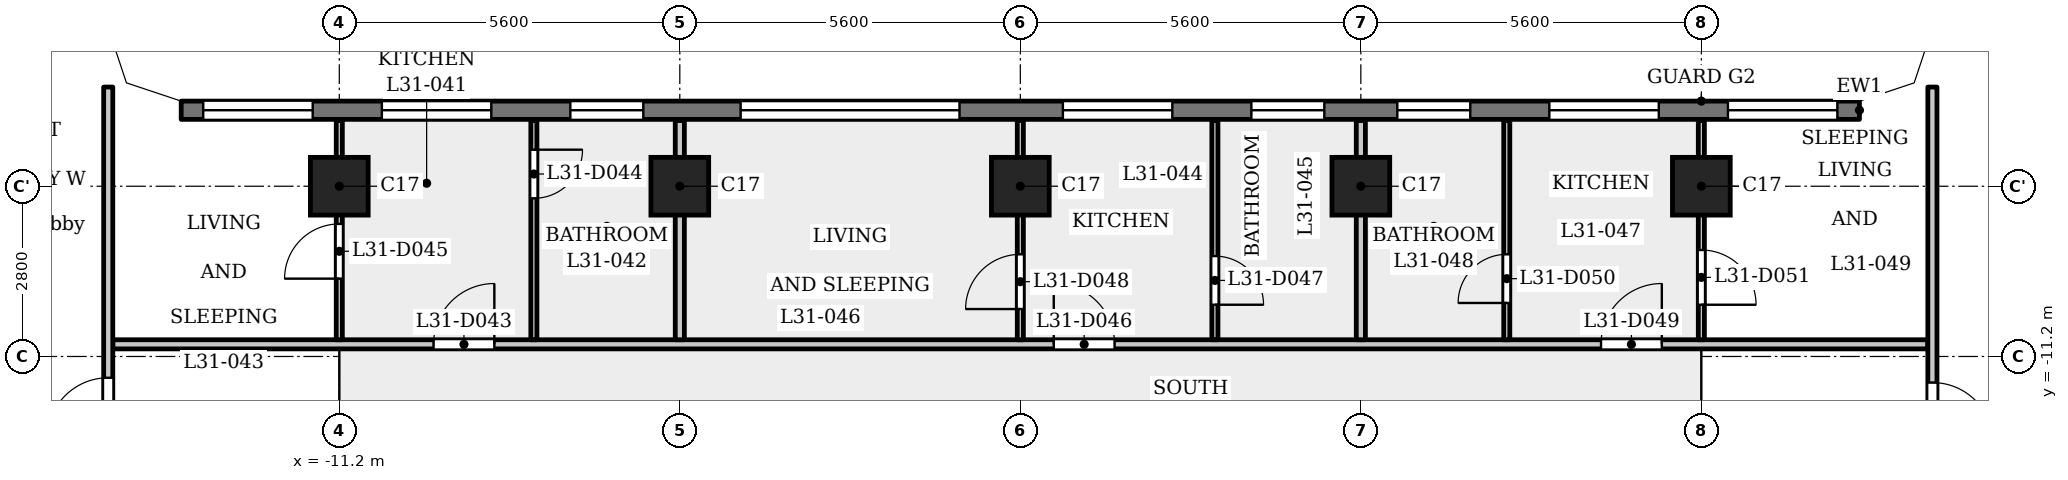
"""IFC4 building model, lengths in metres.
Left out: names, types, materials, properties, quantities, classifications, styles, units other than length and angle.
Written with IfcOpenShell. Run it as: python <this file> out.ifc"""

import sys

from ifc_helpers import new_model, si_unit, direction, frame, frame_2d, origin, origin_2d, place, context, subcontext, project, spatial, polyline, rectangle, outline, extrude, element, fill, save


model = new_model("IFC4")
c1 = context("Model", 3, precision=1e-05, world=origin(), true_north=direction((0.0, 1.0)))
c2 = subcontext(c1, "Body", "Model", "MODEL_VIEW")
j1 = project(units=[si_unit("LENGTHUNIT", "METRE"), si_unit("PLANEANGLEUNIT", "RADIAN")], contexts=[c1])
p1 = place(None, origin())
s1 = spatial("IfcSite", under=j1, at=p1, CompositionType="ELEMENT")
p2 = place(p1, origin())
s2 = spatial("IfcBuilding", under=s1, at=p2, CompositionType="ELEMENT")
p3 = place(p2, frame((0.0, 0.0, 121.8)))
s3 = spatial("IfcBuildingStorey", under=s2, at=p3, CompositionType="ELEMENT", Elevation=121.8)
for number, where, z_axis, x_axis in (
    (1, (-11.2, -8.4, 0.0), (0.0, 0.0, 1.0), (1.0, 0.0, 0.0)),
    (2, (-5.6, -8.4, 0.0), (0.0, 0.0, 1.0), (1.0, 0.0, 0.0)),
    (3, (0.0, -8.4, 0.0), (0.0, 0.0, 1.0), (1.0, 0.0, 0.0)),
    (4, (5.6, -8.4, 0.0), (0.0, 0.0, 1.0), (1.0, 0.0, 0.0)),
    (5, (11.2, -8.4, 0.0), (0.0, 0.0, 1.0), (1.0, 0.0, 0.0)),
):
    element("IfcColumn", number, at=place(p3, frame(where, z_axis=z_axis, x_axis=x_axis)), inside=s3, PredefinedType="COLUMN", context=c2, shape_type="SweptSolid", body=[
        extrude(rectangle(XDim=0.95, YDim=0.95, at=origin_2d()), origin(), (0.0, 0.0, 1.0), 3.5),
    ])
p4 = place(p3, frame((13.8, -7.15, 0.0), z_axis=(0.0, 0.0, 1.0), x_axis=(-1.0, 0.0, 0.0)))
e6 = element("IfcWall", 6, at=p4, inside=s3, PredefinedType="SOLIDWALL", context=c2, shape_type="SweptSolid", body=[
    extrude(rectangle(XDim=27.6, YDim=0.3, at=frame_2d((13.8, 0.0))), origin(), (0.0, 0.0, 1.0), 3.15),
])
p5 = place(p4, frame((0.363, 0.0, 0.9)))
e7 = element("IfcOpeningElement", 7, at=p5, cuts=e6, PredefinedType="OPENING", context=c2, shape_type="SweptSolid", body=[
    extrude(rectangle(XDim=1.8, YDim=1.25, at=frame_2d((0.9, 0.625))), frame((0.0, 0.16, 0.0), z_axis=(0.0, -1.0, 0.0), x_axis=(1.0, 0.0, 0.0)), (0.0, 0.0, 1.0), 0.32),
])
p6 = place(p4, frame((3.3, 0.0, 0.9)))
e8 = element("IfcOpeningElement", 8, at=p6, cuts=e6, PredefinedType="OPENING", context=c2, shape_type="SweptSolid", body=[
    extrude(rectangle(XDim=1.8, YDim=1.25, at=frame_2d((0.9, 0.625))), frame((0.0, 0.16, 0.0), z_axis=(0.0, -1.0, 0.0), x_axis=(1.0, 0.0, 0.0)), (0.0, 0.0, 1.0), 0.32),
])
p7 = place(p4, frame((6.4, 0.0, 0.6)))
e9 = element("IfcOpeningElement", 9, at=p7, cuts=e6, PredefinedType="OPENING", context=c2, shape_type="SweptSolid", body=[
    extrude(rectangle(XDim=1.2, YDim=1.55, at=frame_2d((0.6, 0.775))), frame((0.0, 0.16, 0.0), z_axis=(0.0, -1.0, 0.0), x_axis=(1.0, 0.0, 0.0)), (0.0, 0.0, 1.0), 0.32),
])
p8 = place(p4, frame((8.8, 0.0, 0.6)))
e10 = element("IfcOpeningElement", 10, at=p8, cuts=e6, PredefinedType="OPENING", context=c2, shape_type="SweptSolid", body=[
    extrude(rectangle(XDim=1.2, YDim=1.55, at=frame_2d((0.6, 0.775))), frame((0.0, 0.16, 0.0), z_axis=(0.0, -1.0, 0.0), x_axis=(1.0, 0.0, 0.0)), (0.0, 0.0, 1.0), 0.32),
])
p9 = place(p4, frame((11.3, 0.0, 0.9)))
e11 = element("IfcOpeningElement", 11, at=p9, cuts=e6, PredefinedType="OPENING", context=c2, shape_type="SweptSolid", body=[
    extrude(rectangle(XDim=1.8, YDim=1.25, at=frame_2d((0.9, 0.625))), frame((0.0, 0.16, 0.0), z_axis=(0.0, -1.0, 0.0), x_axis=(1.0, 0.0, 0.0)), (0.0, 0.0, 1.0), 0.32),
])
p10 = place(p4, frame((14.8, 0.0, 1.2)))
e12 = element("IfcOpeningElement", 12, at=p10, cuts=e6, PredefinedType="OPENING", context=c2, shape_type="SweptSolid", body=[
    extrude(rectangle(XDim=3.6, YDim=0.95, at=frame_2d((1.8, 0.475))), frame((0.0, 0.16, 0.0), z_axis=(0.0, -1.0, 0.0), x_axis=(1.0, 0.0, 0.0)), (0.0, 0.0, 1.0), 0.32),
])
p11 = place(p4, frame((20.0, 0.0, 0.6)))
e13 = element("IfcOpeningElement", 13, at=p11, cuts=e6, PredefinedType="OPENING", context=c2, shape_type="SweptSolid", body=[
    extrude(rectangle(XDim=1.2, YDim=1.55, at=frame_2d((0.6, 0.775))), frame((0.0, 0.16, 0.0), z_axis=(0.0, -1.0, 0.0), x_axis=(1.0, 0.0, 0.0)), (0.0, 0.0, 1.0), 0.32),
])
p12 = place(p4, frame((22.5, 0.0, 0.9)))
e14 = element("IfcOpeningElement", 14, at=p12, cuts=e6, PredefinedType="OPENING", context=c2, shape_type="SweptSolid", body=[
    extrude(rectangle(XDim=1.8, YDim=1.25, at=frame_2d((0.9, 0.625))), frame((0.0, 0.16, 0.0), z_axis=(0.0, -1.0, 0.0), x_axis=(1.0, 0.0, 0.0)), (0.0, 0.0, 1.0), 0.32),
])
p13 = place(p4, frame((25.438, 0.0, 0.9)))
e15 = element("IfcOpeningElement", 15, at=p13, cuts=e6, PredefinedType="OPENING", context=c2, shape_type="SweptSolid", body=[
    extrude(rectangle(XDim=1.8, YDim=1.25, at=frame_2d((0.9, 0.625))), frame((0.0, 0.16, 0.0), z_axis=(0.0, -1.0, 0.0), x_axis=(1.0, 0.0, 0.0)), (0.0, 0.0, 1.0), 0.32),
])
p14 = place(p3, frame((-14.925, -11.0, 0.0), z_axis=(0.0, 0.0, 1.0), x_axis=(1.0, 0.0, 0.0)))
e16 = element("IfcWall", 16, at=p14, inside=s3, PredefinedType="PARTITIONING", context=c2, shape_type="SweptSolid", body=[
    extrude(rectangle(XDim=29.85, YDim=0.15, at=frame_2d((14.925, 0.0))), origin(), (0.0, 0.0, 1.0), 3.15),
])
p15 = place(p14, frame((5.275, 0.0, 0.0)))
e17 = element("IfcOpeningElement", 17, at=p15, cuts=e16, PredefinedType="OPENING", context=c2, shape_type="SweptSolid", body=[
    extrude(rectangle(XDim=1.0, YDim=2.1, at=frame_2d((0.5, 1.05))), frame((0.0, 0.085, 0.0), z_axis=(0.0, -1.0, 0.0), x_axis=(1.0, 0.0, 0.0)), (0.0, 0.0, 1.0), 0.17),
])
p16 = place(p14, frame((15.475, 0.0, 0.0)))
e18 = element("IfcOpeningElement", 18, at=p16, cuts=e16, PredefinedType="OPENING", context=c2, shape_type="SweptSolid", body=[
    extrude(rectangle(XDim=1.0, YDim=2.1, at=frame_2d((0.5, 1.05))), frame((0.0, 0.085, 0.0), z_axis=(0.0, -1.0, 0.0), x_axis=(1.0, 0.0, 0.0)), (0.0, 0.0, 1.0), 0.17),
])
p17 = place(p14, frame((24.475, 0.0, 0.0)))
e19 = element("IfcOpeningElement", 19, at=p17, cuts=e16, PredefinedType="OPENING", context=c2, shape_type="SweptSolid", body=[
    extrude(rectangle(XDim=1.0, YDim=2.1, at=frame_2d((0.5, 1.05))), frame((0.0, 0.085, 0.0), z_axis=(0.0, -1.0, 0.0), x_axis=(1.0, 0.0, 0.0)), (0.0, 0.0, 1.0), 0.17),
])
p18 = place(p3, frame((-15.0, -13.125, 0.0), z_axis=(0.0, 0.0, 1.0), x_axis=(0.0, 1.0, 0.0)))
e20 = element("IfcWall", 20, at=p18, inside=s3, PredefinedType="PARTITIONING", context=c2, shape_type="SweptSolid", body=[
    extrude(rectangle(XDim=6.356, YDim=0.15, at=frame_2d((3.178, 0.0))), origin(), (0.0, 0.0, 1.0), 3.15),
])
p19 = place(p18, frame((0.575, 0.0, 0.0)))
e21 = element("IfcOpeningElement", 21, at=p19, cuts=e20, PredefinedType="OPENING", context=c2, shape_type="SweptSolid", body=[
    extrude(rectangle(XDim=1.0, YDim=2.1, at=frame_2d((0.5, 1.05))), frame((0.0, 0.085, 0.0), z_axis=(0.0, -1.0, 0.0), x_axis=(1.0, 0.0, 0.0)), (0.0, 0.0, 1.0), 0.17),
])
p20 = place(p3, frame((-11.2, -10.925, 0.0), z_axis=(0.0, 0.0, 1.0), x_axis=(0.0, 1.0, 0.0)))
e22 = element("IfcWall", 22, at=p20, inside=s3, PredefinedType="PARTITIONING", context=c2, shape_type="SweptSolid", body=[
    extrude(rectangle(XDim=3.605, YDim=0.1, at=frame_2d((1.802, 0.0))), origin(), (0.0, 0.0, 1.0), 3.15),
])
p21 = place(p20, frame((1.005, 0.0, 0.0)))
e23 = element("IfcOpeningElement", 23, at=p21, cuts=e22, PredefinedType="OPENING", context=c2, shape_type="SweptSolid", body=[
    extrude(rectangle(XDim=0.9, YDim=2.1, at=frame_2d((0.45, 1.05))), frame((0.0, 0.06, 0.0), z_axis=(0.0, -1.0, 0.0), x_axis=(1.0, 0.0, 0.0)), (0.0, 0.0, 1.0), 0.12),
])
p22 = place(p3, frame((-8.0, -10.925, 0.0), z_axis=(0.0, 0.0, 1.0), x_axis=(0.0, 1.0, 0.0)))
e24 = element("IfcWall", 24, at=p22, inside=s3, PredefinedType="PARTITIONING", context=c2, shape_type="SweptSolid", body=[
    extrude(rectangle(XDim=3.605, YDim=0.1, at=frame_2d((1.802, 0.0))), origin(), (0.0, 0.0, 1.0), 3.15),
])
p23 = place(p22, frame((2.326, 0.0, 0.0)))
e25 = element("IfcOpeningElement", 25, at=p23, cuts=e24, PredefinedType="OPENING", context=c2, shape_type="SweptSolid", body=[
    extrude(rectangle(XDim=0.8, YDim=2.1, at=frame_2d((0.4, 1.05))), frame((0.0, 0.06, 0.0), z_axis=(0.0, -1.0, 0.0), x_axis=(1.0, 0.0, 0.0)), (0.0, 0.0, 1.0), 0.12),
])
p24 = place(p3, frame((-5.6, -10.925, 0.0), z_axis=(0.0, 0.0, 1.0), x_axis=(0.0, 1.0, 0.0)))
e26 = element("IfcWall", 26, at=p24, inside=s3, PredefinedType="PARTITIONING", context=c2, shape_type="SweptSolid", body=[
    extrude(rectangle(XDim=3.605, YDim=0.15, at=frame_2d((1.802, 0.0))), origin(), (0.0, 0.0, 1.0), 3.15),
])
p25 = place(p3, frame((0.0, -10.925, 0.0), z_axis=(0.0, 0.0, 1.0), x_axis=(0.0, 1.0, 0.0)))
e27 = element("IfcWall", 27, at=p25, inside=s3, PredefinedType="PARTITIONING", context=c2, shape_type="SweptSolid", body=[
    extrude(rectangle(XDim=3.605, YDim=0.1, at=frame_2d((1.802, 0.0))), origin(), (0.0, 0.0, 1.0), 3.15),
])
p26 = place(p25, frame((0.505, 0.0, 0.0)))
e28 = element("IfcOpeningElement", 28, at=p26, cuts=e27, PredefinedType="OPENING", context=c2, shape_type="SweptSolid", body=[
    extrude(rectangle(XDim=0.9, YDim=2.1, at=frame_2d((0.45, 1.05))), frame((0.0, 0.06, 0.0), z_axis=(0.0, -1.0, 0.0), x_axis=(1.0, 0.0, 0.0)), (0.0, 0.0, 1.0), 0.12),
])
p27 = place(p3, frame((3.2, -10.925, 0.0), z_axis=(0.0, 0.0, 1.0), x_axis=(0.0, 1.0, 0.0)))
e29 = element("IfcWall", 29, at=p27, inside=s3, PredefinedType="PARTITIONING", context=c2, shape_type="SweptSolid", body=[
    extrude(rectangle(XDim=3.605, YDim=0.1, at=frame_2d((1.802, 0.0))), origin(), (0.0, 0.0, 1.0), 3.15),
])
p28 = place(p27, frame((0.576, 0.0, 0.0)))
e30 = element("IfcOpeningElement", 30, at=p28, cuts=e29, PredefinedType="OPENING", context=c2, shape_type="SweptSolid", body=[
    extrude(rectangle(XDim=0.8, YDim=2.1, at=frame_2d((0.4, 1.05))), frame((0.0, 0.06, 0.0), z_axis=(0.0, -1.0, 0.0), x_axis=(1.0, 0.0, 0.0)), (0.0, 0.0, 1.0), 0.12),
])
p29 = place(p3, frame((5.6, -10.925, 0.0), z_axis=(0.0, 0.0, 1.0), x_axis=(0.0, 1.0, 0.0)))
e31 = element("IfcWall", 31, at=p29, inside=s3, PredefinedType="PARTITIONING", context=c2, shape_type="SweptSolid", body=[
    extrude(rectangle(XDim=3.605, YDim=0.15, at=frame_2d((1.802, 0.0))), origin(), (0.0, 0.0, 1.0), 3.15),
])
p30 = place(p3, frame((8.0, -10.925, 0.0), z_axis=(0.0, 0.0, 1.0), x_axis=(0.0, 1.0, 0.0)))
e32 = element("IfcWall", 32, at=p30, inside=s3, PredefinedType="PARTITIONING", context=c2, shape_type="SweptSolid", body=[
    extrude(rectangle(XDim=3.605, YDim=0.1, at=frame_2d((1.802, 0.0))), origin(), (0.0, 0.0, 1.0), 3.15),
])
p31 = place(p30, frame((0.605, 0.0, 0.0)))
e33 = element("IfcOpeningElement", 33, at=p31, cuts=e32, PredefinedType="OPENING", context=c2, shape_type="SweptSolid", body=[
    extrude(rectangle(XDim=0.8, YDim=2.1, at=frame_2d((0.4, 1.05))), frame((0.0, 0.06, 0.0), z_axis=(0.0, -1.0, 0.0), x_axis=(1.0, 0.0, 0.0)), (0.0, 0.0, 1.0), 0.12),
])
p32 = place(p3, frame((11.2, -10.925, 0.0), z_axis=(0.0, 0.0, 1.0), x_axis=(0.0, 1.0, 0.0)))
e34 = element("IfcWall", 34, at=p32, inside=s3, PredefinedType="PARTITIONING", context=c2, shape_type="SweptSolid", body=[
    extrude(rectangle(XDim=3.605, YDim=0.1, at=frame_2d((1.802, 0.0))), origin(), (0.0, 0.0, 1.0), 3.15),
])
p33 = place(p32, frame((0.576, 0.0, 0.0)))
e35 = element("IfcOpeningElement", 35, at=p33, cuts=e34, PredefinedType="OPENING", context=c2, shape_type="SweptSolid", body=[
    extrude(rectangle(XDim=0.9, YDim=2.1, at=frame_2d((0.45, 1.05))), frame((0.0, 0.06, 0.0), z_axis=(0.0, -1.0, 0.0), x_axis=(1.0, 0.0, 0.0)), (0.0, 0.0, 1.0), 0.12),
])
p34 = place(p3, frame((15.0, -13.125, 0.0), z_axis=(0.0, 0.0, 1.0), x_axis=(0.0, 1.0, 0.0)))
e36 = element("IfcWall", 36, at=p34, inside=s3, PredefinedType="PARTITIONING", context=c2, shape_type="SweptSolid", body=[
    extrude(rectangle(XDim=6.356, YDim=0.15, at=frame_2d((3.178, 0.0))), origin(), (0.0, 0.0, 1.0), 3.15),
])
p35 = place(p34, frame((0.496, 0.0, 0.0)))
e37 = element("IfcOpeningElement", 37, at=p35, cuts=e36, PredefinedType="OPENING", context=c2, shape_type="SweptSolid", body=[
    extrude(rectangle(XDim=1.0, YDim=2.1, at=frame_2d((0.5, 1.05))), frame((0.0, 0.085, 0.0), z_axis=(0.0, -1.0, 0.0), x_axis=(1.0, 0.0, 0.0)), (0.0, 0.0, 1.0), 0.17),
])
p36 = place(p3, origin())
e38 = element("IfcWall", 38, at=p36, inside=s3, PredefinedType="SOLIDWALL", context=c2, shape_type="SweptSolid", body=[
    extrude(outline(polyline([(14.937, -6.937), (15.3, -5.849), (15.3, -5.8), (15.0, -5.8), (14.7, -6.7), (13.8, -7.0), (13.8, -7.3), (13.849, -7.3), (14.937, -6.937)])), origin(), (0.0, 0.0, 1.0), 3.15),
])
e39 = element("IfcWall", 39, at=p36, inside=s3, PredefinedType="SOLIDWALL", context=c2, shape_type="SweptSolid", body=[
    extrude(outline(polyline([(-14.937, -6.937), (-13.849, -7.3), (-13.8, -7.3), (-13.8, -7.0), (-14.7, -6.7), (-15.0, -5.8), (-15.3, -5.8), (-15.3, -5.849), (-14.937, -6.937)])), origin(), (0.0, 0.0, 1.0), 3.15),
])
p37 = place(p19, origin())
e40 = element("IfcDoor", 40, at=p37, inside=s3, OperationType="SINGLE_SWING_RIGHT", PredefinedType="DOOR", context=c2, shape_type="SweptSolid", body=[
    extrude(rectangle(XDim=1.0, YDim=2.1, at=frame_2d((0.5, 1.05))), frame((0.0, 0.025, 0.0), z_axis=(0.0, -1.0, 0.0), x_axis=(1.0, 0.0, 0.0)), (0.0, 0.0, 1.0), 0.05),
])
fill(e21, e40)
p38 = place(p35, origin())
e41 = element("IfcDoor", 41, at=p38, inside=s3, OperationType="SINGLE_SWING_LEFT", PredefinedType="DOOR", context=c2, shape_type="SweptSolid", body=[
    extrude(rectangle(XDim=1.0, YDim=2.1, at=frame_2d((0.5, 1.05))), frame((0.0, 0.025, 0.0), z_axis=(0.0, -1.0, 0.0), x_axis=(1.0, 0.0, 0.0)), (0.0, 0.0, 1.0), 0.05),
])
fill(e37, e41)
p39 = place(p15, origin())
e42 = element("IfcDoor", 42, at=p39, inside=s3, OperationType="SINGLE_SWING_LEFT", PredefinedType="DOOR", context=c2, shape_type="SweptSolid", body=[
    extrude(rectangle(XDim=1.0, YDim=2.1, at=frame_2d((0.5, 1.05))), frame((0.0, 0.025, 0.0), z_axis=(0.0, -1.0, 0.0), x_axis=(1.0, 0.0, 0.0)), (0.0, 0.0, 1.0), 0.05),
])
fill(e17, e42)
p40 = place(p23, origin())
e43 = element("IfcDoor", 43, at=p40, inside=s3, OperationType="SINGLE_SWING_RIGHT", PredefinedType="DOOR", context=c2, shape_type="SweptSolid", body=[
    extrude(rectangle(XDim=0.8, YDim=2.1, at=frame_2d((0.4, 1.05))), frame((0.0, 0.025, 0.0), z_axis=(0.0, -1.0, 0.0), x_axis=(1.0, 0.0, 0.0)), (0.0, 0.0, 1.0), 0.05),
])
fill(e25, e43)
p41 = place(p21, origin())
e44 = element("IfcDoor", 44, at=p41, inside=s3, OperationType="SINGLE_SWING_RIGHT", PredefinedType="DOOR", context=c2, shape_type="SweptSolid", body=[
    extrude(rectangle(XDim=0.9, YDim=2.1, at=frame_2d((0.45, 1.05))), frame((0.0, 0.025, 0.0), z_axis=(0.0, -1.0, 0.0), x_axis=(1.0, 0.0, 0.0)), (0.0, 0.0, 1.0), 0.05),
])
fill(e23, e44)
p42 = place(p16, origin())
e45 = element("IfcDoor", 45, at=p42, inside=s3, OperationType="SINGLE_SWING_RIGHT", PredefinedType="DOOR", context=c2, shape_type="SweptSolid", body=[
    extrude(rectangle(XDim=1.0, YDim=2.1, at=frame_2d((0.5, 1.05))), frame((0.0, 0.025, 0.0), z_axis=(0.0, -1.0, 0.0), x_axis=(1.0, 0.0, 0.0)), (0.0, 0.0, 1.0), 0.05),
])
fill(e18, e45)
p43 = place(p28, origin())
e46 = element("IfcDoor", 46, at=p43, inside=s3, OperationType="SINGLE_SWING_LEFT", PredefinedType="DOOR", context=c2, shape_type="SweptSolid", body=[
    extrude(rectangle(XDim=0.8, YDim=2.1, at=frame_2d((0.4, 1.05))), frame((0.0, 0.025, 0.0), z_axis=(0.0, -1.0, 0.0), x_axis=(1.0, 0.0, 0.0)), (0.0, 0.0, 1.0), 0.05),
])
fill(e30, e46)
p44 = place(p26, origin())
e47 = element("IfcDoor", 47, at=p44, inside=s3, OperationType="SINGLE_SWING_RIGHT", PredefinedType="DOOR", context=c2, shape_type="SweptSolid", body=[
    extrude(rectangle(XDim=0.9, YDim=2.1, at=frame_2d((0.45, 1.05))), frame((0.0, 0.025, 0.0), z_axis=(0.0, -1.0, 0.0), x_axis=(1.0, 0.0, 0.0)), (0.0, 0.0, 1.0), 0.05),
])
fill(e28, e47)
p45 = place(p17, origin())
e48 = element("IfcDoor", 48, at=p45, inside=s3, OperationType="SINGLE_SWING_LEFT", PredefinedType="DOOR", context=c2, shape_type="SweptSolid", body=[
    extrude(rectangle(XDim=1.0, YDim=2.1, at=frame_2d((0.5, 1.05))), frame((0.0, 0.025, 0.0), z_axis=(0.0, -1.0, 0.0), x_axis=(1.0, 0.0, 0.0)), (0.0, 0.0, 1.0), 0.05),
])
fill(e19, e48)
p46 = place(p31, origin())
e49 = element("IfcDoor", 49, at=p46, inside=s3, OperationType="SINGLE_SWING_RIGHT", PredefinedType="DOOR", context=c2, shape_type="SweptSolid", body=[
    extrude(rectangle(XDim=0.8, YDim=2.1, at=frame_2d((0.4, 1.05))), frame((0.0, 0.025, 0.0), z_axis=(0.0, -1.0, 0.0), x_axis=(1.0, 0.0, 0.0)), (0.0, 0.0, 1.0), 0.05),
])
fill(e33, e49)
p47 = place(p33, origin())
e50 = element("IfcDoor", 50, at=p47, inside=s3, OperationType="SINGLE_SWING_LEFT", PredefinedType="DOOR", context=c2, shape_type="SweptSolid", body=[
    extrude(rectangle(XDim=0.9, YDim=2.1, at=frame_2d((0.45, 1.05))), frame((0.0, 0.025, 0.0), z_axis=(0.0, -1.0, 0.0), x_axis=(1.0, 0.0, 0.0)), (0.0, 0.0, 1.0), 0.05),
])
fill(e35, e50)
p48 = place(p5, origin())
e51 = element("IfcWindow", 51, at=p48, inside=s3, PartitioningType="SINGLE_PANEL", PredefinedType="WINDOW", context=c2, shape_type="SweptSolid", body=[
    extrude(rectangle(XDim=1.8, YDim=1.25, at=frame_2d((0.9, 0.625))), frame((0.0, 0.03, 0.0), z_axis=(0.0, -1.0, 0.0), x_axis=(1.0, 0.0, 0.0)), (0.0, 0.0, 1.0), 0.06),
])
fill(e7, e51)
p49 = place(p6, origin())
e52 = element("IfcWindow", 52, at=p49, inside=s3, PartitioningType="SINGLE_PANEL", PredefinedType="WINDOW", context=c2, shape_type="SweptSolid", body=[
    extrude(rectangle(XDim=1.8, YDim=1.25, at=frame_2d((0.9, 0.625))), frame((0.0, 0.03, 0.0), z_axis=(0.0, -1.0, 0.0), x_axis=(1.0, 0.0, 0.0)), (0.0, 0.0, 1.0), 0.06),
])
fill(e8, e52)
p50 = place(p7, origin())
e53 = element("IfcWindow", 53, at=p50, inside=s3, PartitioningType="SINGLE_PANEL", PredefinedType="WINDOW", context=c2, shape_type="SweptSolid", body=[
    extrude(rectangle(XDim=1.2, YDim=1.55, at=frame_2d((0.6, 0.775))), frame((0.0, 0.03, 0.0), z_axis=(0.0, -1.0, 0.0), x_axis=(1.0, 0.0, 0.0)), (0.0, 0.0, 1.0), 0.06),
])
fill(e9, e53)
p51 = place(p8, origin())
e54 = element("IfcWindow", 54, at=p51, inside=s3, PartitioningType="SINGLE_PANEL", PredefinedType="WINDOW", context=c2, shape_type="SweptSolid", body=[
    extrude(rectangle(XDim=1.2, YDim=1.55, at=frame_2d((0.6, 0.775))), frame((0.0, 0.03, 0.0), z_axis=(0.0, -1.0, 0.0), x_axis=(1.0, 0.0, 0.0)), (0.0, 0.0, 1.0), 0.06),
])
fill(e10, e54)
p52 = place(p9, origin())
e55 = element("IfcWindow", 55, at=p52, inside=s3, PartitioningType="SINGLE_PANEL", PredefinedType="WINDOW", context=c2, shape_type="SweptSolid", body=[
    extrude(rectangle(XDim=1.8, YDim=1.25, at=frame_2d((0.9, 0.625))), frame((0.0, 0.03, 0.0), z_axis=(0.0, -1.0, 0.0), x_axis=(1.0, 0.0, 0.0)), (0.0, 0.0, 1.0), 0.06),
])
fill(e11, e55)
p53 = place(p10, origin())
e56 = element("IfcWindow", 56, at=p53, inside=s3, PartitioningType="SINGLE_PANEL", PredefinedType="WINDOW", context=c2, shape_type="SweptSolid", body=[
    extrude(rectangle(XDim=3.6, YDim=0.95, at=frame_2d((1.8, 0.475))), frame((0.0, 0.03, 0.0), z_axis=(0.0, -1.0, 0.0), x_axis=(1.0, 0.0, 0.0)), (0.0, 0.0, 1.0), 0.06),
])
fill(e12, e56)
p54 = place(p11, origin())
e57 = element("IfcWindow", 57, at=p54, inside=s3, PartitioningType="SINGLE_PANEL", PredefinedType="WINDOW", context=c2, shape_type="SweptSolid", body=[
    extrude(rectangle(XDim=1.2, YDim=1.55, at=frame_2d((0.6, 0.775))), frame((0.0, 0.03, 0.0), z_axis=(0.0, -1.0, 0.0), x_axis=(1.0, 0.0, 0.0)), (0.0, 0.0, 1.0), 0.06),
])
fill(e13, e57)
p55 = place(p12, origin())
e58 = element("IfcWindow", 58, at=p55, inside=s3, PartitioningType="SINGLE_PANEL", PredefinedType="WINDOW", context=c2, shape_type="SweptSolid", body=[
    extrude(rectangle(XDim=1.8, YDim=1.25, at=frame_2d((0.9, 0.625))), frame((0.0, 0.03, 0.0), z_axis=(0.0, -1.0, 0.0), x_axis=(1.0, 0.0, 0.0)), (0.0, 0.0, 1.0), 0.06),
])
fill(e14, e58)
p56 = place(p13, origin())
e59 = element("IfcWindow", 59, at=p56, inside=s3, PartitioningType="SINGLE_PANEL", PredefinedType="WINDOW", context=c2, shape_type="SweptSolid", body=[
    extrude(rectangle(XDim=1.8, YDim=1.25, at=frame_2d((0.9, 0.625))), frame((0.0, 0.03, 0.0), z_axis=(0.0, -1.0, 0.0), x_axis=(1.0, 0.0, 0.0)), (0.0, 0.0, 1.0), 0.06),
])
fill(e15, e59)
save(model, sys.argv[1])
